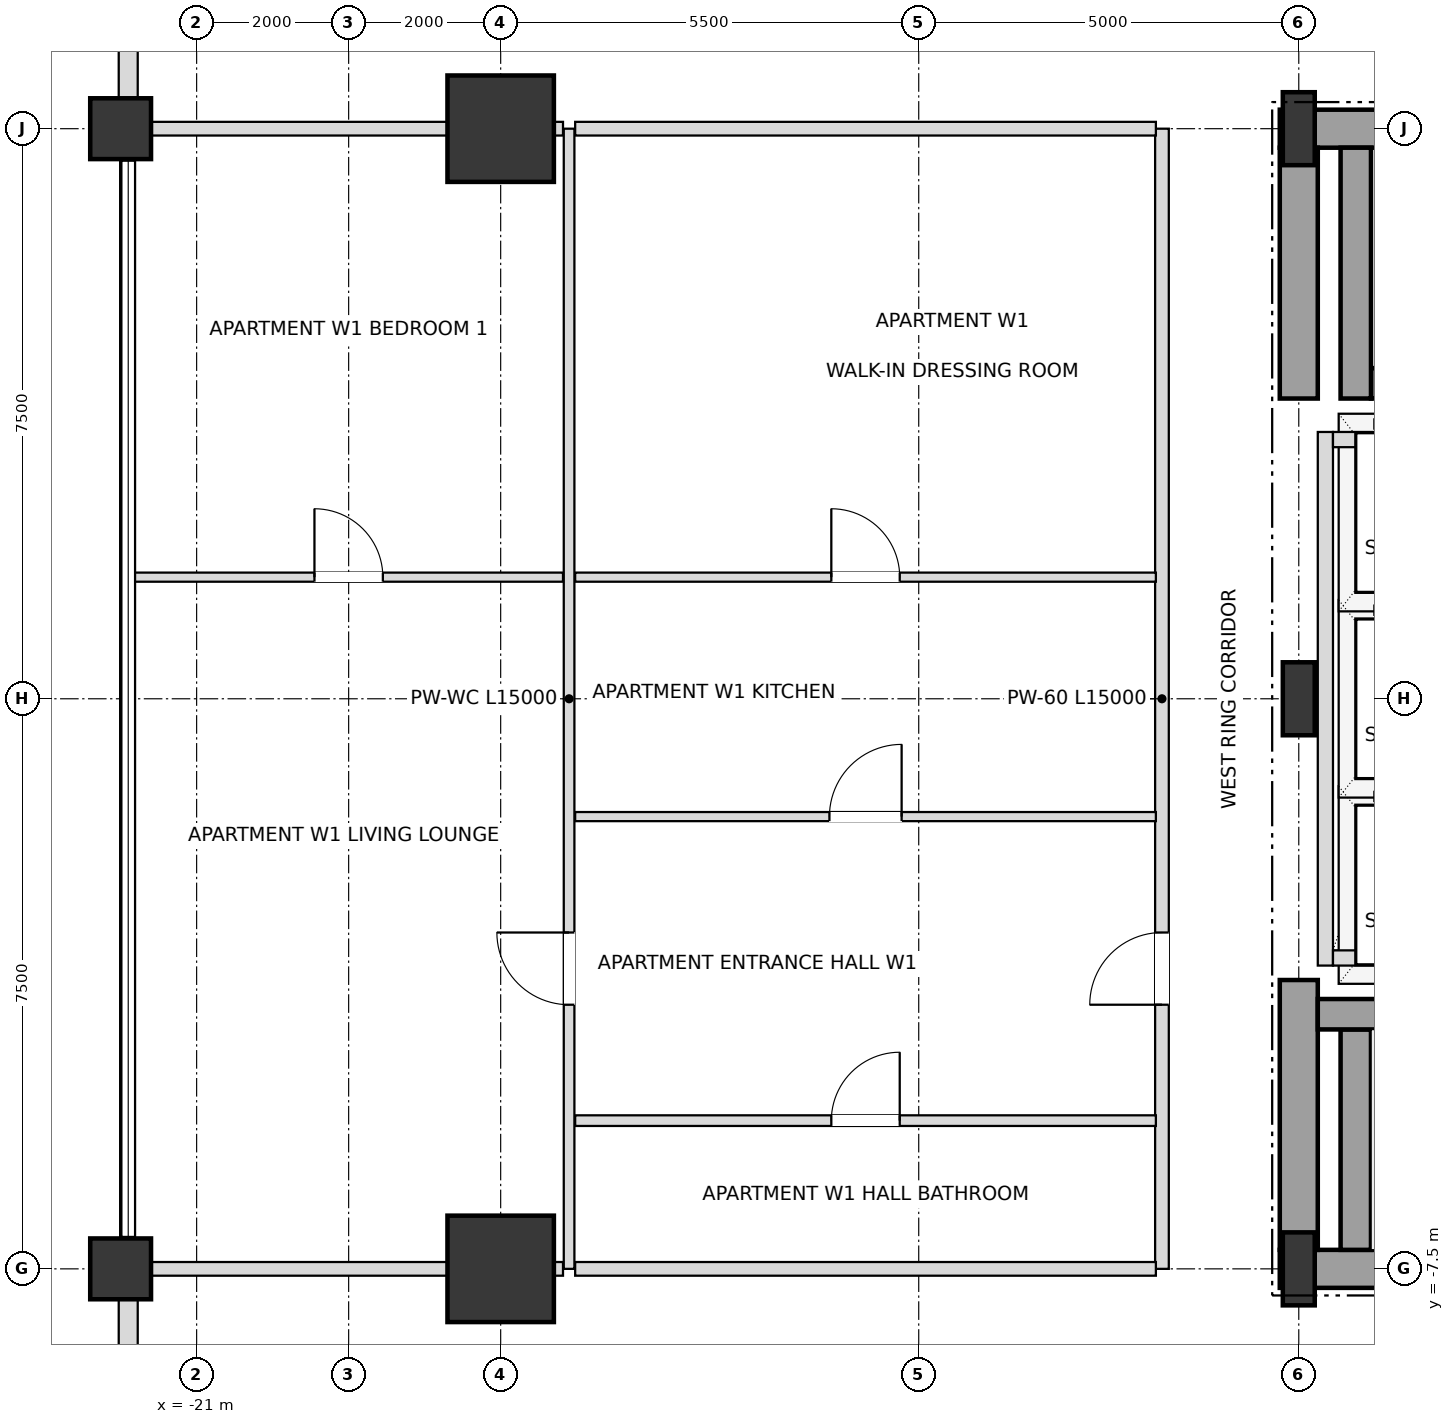
"""IFC4 building model, lengths in metres.
Left out: names, types, materials, properties, quantities, classifications, styles, units other than length and angle.
Written with IfcOpenShell. Run it as: python <this file> out.ifc"""

import sys

from ifc_helpers import new_model, si_unit, direction, frame, frame_2d, origin, origin_2d, place, context, subcontext, project, spatial, rectangle, i_section, extrude, element, fill, save


model = new_model("IFC4")
c1 = context("Model", 3, precision=1e-05, world=origin(), true_north=direction((0.0, 1.0)))
c2 = subcontext(c1, "Body", "Model", "MODEL_VIEW")
j1 = project(units=[si_unit("LENGTHUNIT", "METRE"), si_unit("PLANEANGLEUNIT", "RADIAN")], contexts=[c1])
p1 = place(None, origin())
s1 = spatial("IfcSite", under=j1, at=p1, CompositionType="ELEMENT")
p2 = place(p1, origin())
s2 = spatial("IfcBuilding", under=s1, at=p2, CompositionType="ELEMENT")
p3 = place(p2, frame((0.0, 0.0, 75.6)))
s3 = spatial("IfcBuildingStorey", under=s2, at=p3, CompositionType="ELEMENT", Elevation=75.6)
for number, where, z_axis, x_axis in (
    (1, (-6.5, -7.5, 0.0), (0.0, 0.0, 1.0), (1.0, 0.0, 0.0)),
    (2, (-6.5, 0.0, 0.0), (0.0, 0.0, 1.0), (1.0, 0.0, 0.0)),
    (3, (-6.5, 7.5, 0.0), (0.0, 0.0, 1.0), (1.0, 0.0, 0.0)),
):
    element("IfcColumn", number, at=place(p3, frame(where, z_axis=z_axis, x_axis=x_axis)), inside=s3, PredefinedType="COLUMN", context=c2, shape_type="SweptSolid", body=[
        extrude(i_section(OverallWidth=0.42, OverallDepth=0.96, WebThickness=0.022, FlangeThickness=0.034, at=origin_2d()), origin(), (0.0, 0.0, 1.0), 3.6),
    ])
for number, where, z_axis, x_axis in (
    (4, (-17.0, 7.5, 0.0), (0.0, 0.0, 1.0), (1.0, 0.0, 0.0)),
    (5, (-17.0, -7.5, 0.0), (0.0, 0.0, 1.0), (1.0, 0.0, 0.0)),
):
    element("IfcColumn", number, at=place(p3, frame(where, z_axis=z_axis, x_axis=x_axis)), inside=s3, PredefinedType="USERDEFINED", context=c2, shape_type="SweptSolid", body=[
        extrude(rectangle(XDim=1.4, YDim=1.4, at=origin_2d()), origin(), (0.0, 0.0, 1.0), 3.6),
    ])
for number, where, z_axis, x_axis in (
    (6, (-22.0, -7.5, 0.0), (0.0, 0.0, 1.0), (1.0, 0.0, 0.0)),
    (7, (-22.0, 7.5, 0.0), (0.0, 0.0, 1.0), (1.0, 0.0, 0.0)),
):
    element("IfcColumn", number, at=place(p3, frame(where, z_axis=z_axis, x_axis=x_axis)), inside=s3, PredefinedType="COLUMN", context=c2, shape_type="SweptSolid", body=[
        extrude(rectangle(XDim=0.8, YDim=0.8, at=origin_2d()), origin(), (0.0, 0.0, 1.0), 3.6),
    ])
p4 = place(p3, frame((-21.9, 12.605, 0.0), z_axis=(0.0, 0.0, 1.0), x_axis=(0.0, -1.0, 0.0)))
e8 = element("IfcWall", 8, at=p4, inside=s3, PredefinedType="SOLIDWALL", context=c2, shape_type="SweptSolid", body=[
    extrude(rectangle(XDim=4.71, YDim=0.25, at=frame_2d((2.355, 0.0))), origin(), (0.0, 0.0, 1.0), 2.736),
])
p5 = place(p4, frame((1.455, 0.0, 0.72)))
e9 = element("IfcOpeningElement", 9, at=p5, cuts=e8, PredefinedType="OPENING", context=c2, shape_type="SweptSolid", body=[
    extrude(rectangle(XDim=1.8, YDim=1.68, at=frame_2d((0.9, 0.84))), frame((0.0, 0.135, 0.0), z_axis=(0.0, -1.0, 0.0), x_axis=(1.0, 0.0, 0.0)), (0.0, 0.0, 1.0), 0.27),
])
p6 = place(p3, frame((-21.9, -7.895, 0.0), z_axis=(0.0, 0.0, 1.0), x_axis=(0.0, -1.0, 0.0)))
e10 = element("IfcWall", 10, at=p6, inside=s3, PredefinedType="SOLIDWALL", context=c2, shape_type="SweptSolid", body=[
    extrude(rectangle(XDim=4.71, YDim=0.25, at=frame_2d((2.355, 0.0))), origin(), (0.0, 0.0, 1.0), 2.736),
])
p7 = place(p6, frame((1.455, 0.0, 0.72)))
e11 = element("IfcOpeningElement", 11, at=p7, cuts=e10, PredefinedType="OPENING", context=c2, shape_type="SweptSolid", body=[
    extrude(rectangle(XDim=1.8, YDim=1.68, at=frame_2d((0.9, 0.84))), frame((0.0, 0.135, 0.0), z_axis=(0.0, -1.0, 0.0), x_axis=(1.0, 0.0, 0.0)), (0.0, 0.0, 1.0), 0.27),
])
p8 = place(p3, frame((-6.75, -7.5, 0.0), z_axis=(0.0, 0.0, 1.0), x_axis=(1.0, 0.0, 0.0)))
e12 = element("IfcWall", 12, at=p8, inside=s3, PredefinedType="SHEAR", context=c2, shape_type="SweptSolid", body=[
    extrude(rectangle(XDim=6.75, YDim=0.5, at=frame_2d((3.375, 0.0))), origin(), (0.0, 0.0, 1.0), 3.38),
])
p9 = place(p3, frame((-6.75, 7.5, 0.0), z_axis=(0.0, 0.0, 1.0), x_axis=(1.0, 0.0, 0.0)))
e13 = element("IfcWall", 13, at=p9, inside=s3, PredefinedType="SHEAR", context=c2, shape_type="SweptSolid", body=[
    extrude(rectangle(XDim=6.75, YDim=0.5, at=frame_2d((3.375, 0.0))), origin(), (0.0, 0.0, 1.0), 3.38),
])
p10 = place(p9, frame((1.65, 0.0, 0.0)))
e14 = element("IfcOpeningElement", 14, at=p10, cuts=e13, PredefinedType="OPENING", context=c2, shape_type="SweptSolid", body=[
    extrude(rectangle(XDim=1.05, YDim=2.15, at=frame_2d((0.525, 1.075))), frame((0.0, 0.26, 0.0), z_axis=(0.0, -1.0, 0.0), x_axis=(1.0, 0.0, 0.0)), (0.0, 0.0, 1.0), 0.52),
])
p11 = place(p3, frame((-6.5, -7.25, 0.0), z_axis=(0.0, 0.0, 1.0), x_axis=(0.0, 1.0, 0.0)))
e15 = element("IfcWall", 15, at=p11, inside=s3, PredefinedType="SHEAR", context=c2, shape_type="SweptSolid", body=[
    extrude(rectangle(XDim=3.55, YDim=0.5, at=frame_2d((1.775, 0.0))), origin(), (0.0, 0.0, 1.0), 3.38),
])
p12 = place(p3, frame((-6.5, 3.95, 0.0), z_axis=(0.0, 0.0, 1.0), x_axis=(0.0, 1.0, 0.0)))
e16 = element("IfcWall", 16, at=p12, inside=s3, PredefinedType="SHEAR", context=c2, shape_type="SweptSolid", body=[
    extrude(rectangle(XDim=3.3, YDim=0.5, at=frame_2d((1.65, 0.0))), origin(), (0.0, 0.0, 1.0), 3.38),
])
p13 = place(p3, frame((-5.75, -7.25, 0.0), z_axis=(0.0, 0.0, 1.0), x_axis=(0.0, 1.0, 0.0)))
e17 = element("IfcWall", 17, at=p13, inside=s3, PredefinedType="SHEAR", context=c2, shape_type="SweptSolid", body=[
    extrude(rectangle(XDim=2.9, YDim=0.4, at=frame_2d((1.45, 0.0))), origin(), (0.0, 0.0, 1.0), 3.38),
])
p14 = place(p3, frame((-6.25, -4.15, 0.0), z_axis=(0.0, 0.0, 1.0), x_axis=(1.0, 0.0, 0.0)))
e18 = element("IfcWall", 18, at=p14, inside=s3, PredefinedType="SHEAR", context=c2, shape_type="SweptSolid", body=[
    extrude(rectangle(XDim=7.78, YDim=0.4, at=frame_2d((3.89, 0.0))), origin(), (0.0, 0.0, 1.0), 3.38),
])
p15 = place(p3, frame((-5.55, 4.15, 0.0), z_axis=(0.0, 0.0, 1.0), x_axis=(1.0, 0.0, 0.0)))
e19 = element("IfcWall", 19, at=p15, inside=s3, PredefinedType="SHEAR", context=c2, shape_type="SweptSolid", body=[
    extrude(rectangle(XDim=7.08, YDim=0.4, at=frame_2d((3.54, 0.0))), origin(), (0.0, 0.0, 1.0), 3.38),
])
p16 = place(p3, frame((-5.75, 3.95, 0.0), z_axis=(0.0, 0.0, 1.0), x_axis=(0.0, 1.0, 0.0)))
e20 = element("IfcWall", 20, at=p16, inside=s3, PredefinedType="SHEAR", context=c2, shape_type="SweptSolid", body=[
    extrude(rectangle(XDim=3.3, YDim=0.4, at=frame_2d((1.65, 0.0))), origin(), (0.0, 0.0, 1.0), 3.38),
])
p17 = place(p3, frame((-6.15, -3.51, 0.0), z_axis=(0.0, 0.0, 1.0), x_axis=(0.0, 1.0, 0.0)))
e21 = element("IfcWall", 21, at=p17, inside=s3, PredefinedType="SOLIDWALL", context=c2, shape_type="SweptSolid", body=[
    extrude(rectangle(XDim=7.02, YDim=0.2, at=frame_2d((3.51, 0.0))), origin(), (0.0, 0.0, 1.0), 3.38),
])
for number, where, z_axis, x_axis in (
    (22, (-6.05, -3.41, 0.0), (0.0, 0.0, 1.0), (1.0, 0.0, 0.0)),
    (23, (-6.05, 3.41, 0.0), (0.0, 0.0, 1.0), (1.0, 0.0, 0.0)),
):
    element("IfcWall", number, at=place(p3, frame(where, z_axis=z_axis, x_axis=x_axis)), inside=s3, PredefinedType="SOLIDWALL", context=c2, shape_type="SweptSolid", body=[
        extrude(rectangle(XDim=2.2, YDim=0.2, at=frame_2d((1.1, 0.0))), origin(), (0.0, 0.0, 1.0), 3.38),
    ])
p18 = place(p3, frame((-16.1, -7.5, 0.0), z_axis=(0.0, 0.0, 1.0), x_axis=(0.0, 1.0, 0.0)))
e24 = element("IfcWall", 24, at=p18, inside=s3, PredefinedType="PARTITIONING", context=c2, shape_type="SweptSolid", body=[
    extrude(rectangle(XDim=15.0, YDim=0.14, at=frame_2d((7.5, 0.0))), origin(), (0.0, 0.0, 1.0), 3.38),
])
p19 = place(p18, frame((3.475, 0.0, 0.0)))
e25 = element("IfcOpeningElement", 25, at=p19, cuts=e24, PredefinedType="OPENING", context=c2, shape_type="SweptSolid", body=[
    extrude(rectangle(XDim=0.95, YDim=2.1, at=frame_2d((0.475, 1.05))), frame((0.0, 0.08, 0.0), z_axis=(0.0, -1.0, 0.0), x_axis=(1.0, 0.0, 0.0)), (0.0, 0.0, 1.0), 0.16),
])
p20 = place(p3, frame((-8.3, -7.5, 0.0), z_axis=(0.0, 0.0, 1.0), x_axis=(0.0, 1.0, 0.0)))
e26 = element("IfcWall", 26, at=p20, inside=s3, PredefinedType="PARTITIONING", context=c2, shape_type="SweptSolid", body=[
    extrude(rectangle(XDim=15.0, YDim=0.18, at=frame_2d((7.5, 0.0))), origin(), (0.0, 0.0, 1.0), 3.38),
])
p21 = place(p20, frame((3.475, 0.0, 0.0)))
e27 = element("IfcOpeningElement", 27, at=p21, cuts=e26, PredefinedType="OPENING", context=c2, shape_type="SweptSolid", body=[
    extrude(rectangle(XDim=0.95, YDim=2.15, at=frame_2d((0.475, 1.075))), frame((0.0, 0.1, 0.0), z_axis=(0.0, -1.0, 0.0), x_axis=(1.0, 0.0, 0.0)), (0.0, 0.0, 1.0), 0.2),
])
p22 = place(p3, frame((-21.9, -7.5, 0.0), z_axis=(0.0, 0.0, 1.0), x_axis=(1.0, 0.0, 0.0)))
e28 = element("IfcWall", 28, at=p22, inside=s3, PredefinedType="PARTITIONING", context=c2, shape_type="SweptSolid", body=[
    extrude(rectangle(XDim=5.72, YDim=0.18, at=frame_2d((2.86, 0.0))), origin(), (0.0, 0.0, 1.0), 2.816),
])
p23 = place(p3, frame((-16.02, -7.5, 0.0), z_axis=(0.0, 0.0, 1.0), x_axis=(1.0, 0.0, 0.0)))
e29 = element("IfcWall", 29, at=p23, inside=s3, PredefinedType="PARTITIONING", context=c2, shape_type="SweptSolid", body=[
    extrude(rectangle(XDim=7.64, YDim=0.18, at=frame_2d((3.82, 0.0))), origin(), (0.0, 0.0, 1.0), 2.816),
])
p24 = place(p3, frame((-16.02, -5.55, 0.0), z_axis=(0.0, 0.0, 1.0), x_axis=(1.0, 0.0, 0.0)))
e30 = element("IfcWall", 30, at=p24, inside=s3, PredefinedType="PARTITIONING", context=c2, shape_type="SweptSolid", body=[
    extrude(rectangle(XDim=7.64, YDim=0.14, at=frame_2d((3.82, 0.0))), origin(), (0.0, 0.0, 1.0), 2.948),
])
p25 = place(p24, frame((3.37, 0.0, 0.0)))
e31 = element("IfcOpeningElement", 31, at=p25, cuts=e30, PredefinedType="OPENING", context=c2, shape_type="SweptSolid", body=[
    extrude(rectangle(XDim=0.9, YDim=2.1, at=frame_2d((0.45, 1.05))), frame((0.0, 0.08, 0.0), z_axis=(0.0, -1.0, 0.0), x_axis=(1.0, 0.0, 0.0)), (0.0, 0.0, 1.0), 0.16),
])
p26 = place(p3, frame((-16.02, -1.55, 0.0), z_axis=(0.0, 0.0, 1.0), x_axis=(1.0, 0.0, 0.0)))
e32 = element("IfcWall", 32, at=p26, inside=s3, PredefinedType="PARTITIONING", context=c2, shape_type="SweptSolid", body=[
    extrude(rectangle(XDim=7.64, YDim=0.12, at=frame_2d((3.82, 0.0))), origin(), (0.0, 0.0, 1.0), 2.948),
])
p27 = place(p26, frame((3.345, 0.0, 0.0)))
e33 = element("IfcOpeningElement", 33, at=p27, cuts=e32, PredefinedType="OPENING", context=c2, shape_type="SweptSolid", body=[
    extrude(rectangle(XDim=0.95, YDim=2.1, at=frame_2d((0.475, 1.05))), frame((0.0, 0.07, 0.0), z_axis=(0.0, -1.0, 0.0), x_axis=(1.0, 0.0, 0.0)), (0.0, 0.0, 1.0), 0.14),
])
p28 = place(p3, frame((-21.82, 1.6, 0.0), z_axis=(0.0, 0.0, 1.0), x_axis=(1.0, 0.0, 0.0)))
e34 = element("IfcWall", 34, at=p28, inside=s3, PredefinedType="PARTITIONING", context=c2, shape_type="SweptSolid", body=[
    extrude(rectangle(XDim=5.64, YDim=0.12, at=frame_2d((2.82, 0.0))), origin(), (0.0, 0.0, 1.0), 2.816),
])
p29 = place(p28, frame((2.37, 0.0, 0.0)))
e35 = element("IfcOpeningElement", 35, at=p29, cuts=e34, PredefinedType="OPENING", context=c2, shape_type="SweptSolid", body=[
    extrude(rectangle(XDim=0.9, YDim=2.1, at=frame_2d((0.45, 1.05))), frame((0.0, 0.07, 0.0), z_axis=(0.0, -1.0, 0.0), x_axis=(1.0, 0.0, 0.0)), (0.0, 0.0, 1.0), 0.14),
])
p30 = place(p3, frame((-16.02, 1.6, 0.0), z_axis=(0.0, 0.0, 1.0), x_axis=(1.0, 0.0, 0.0)))
e36 = element("IfcWall", 36, at=p30, inside=s3, PredefinedType="PARTITIONING", context=c2, shape_type="SweptSolid", body=[
    extrude(rectangle(XDim=7.64, YDim=0.12, at=frame_2d((3.82, 0.0))), origin(), (0.0, 0.0, 1.0), 2.948),
])
p31 = place(p30, frame((3.37, 0.0, 0.0)))
e37 = element("IfcOpeningElement", 37, at=p31, cuts=e36, PredefinedType="OPENING", context=c2, shape_type="SweptSolid", body=[
    extrude(rectangle(XDim=0.9, YDim=2.1, at=frame_2d((0.45, 1.05))), frame((0.0, 0.07, 0.0), z_axis=(0.0, -1.0, 0.0), x_axis=(1.0, 0.0, 0.0)), (0.0, 0.0, 1.0), 0.14),
])
p32 = place(p3, frame((-21.9, 7.5, 0.0), z_axis=(0.0, 0.0, 1.0), x_axis=(1.0, 0.0, 0.0)))
e38 = element("IfcWall", 38, at=p32, inside=s3, PredefinedType="PARTITIONING", context=c2, shape_type="SweptSolid", body=[
    extrude(rectangle(XDim=5.72, YDim=0.18, at=frame_2d((2.86, 0.0))), origin(), (0.0, 0.0, 1.0), 2.816),
])
p33 = place(p3, frame((-16.02, 7.5, 0.0), z_axis=(0.0, 0.0, 1.0), x_axis=(1.0, 0.0, 0.0)))
e39 = element("IfcWall", 39, at=p33, inside=s3, PredefinedType="PARTITIONING", context=c2, shape_type="SweptSolid", body=[
    extrude(rectangle(XDim=7.64, YDim=0.18, at=frame_2d((3.82, 0.0))), origin(), (0.0, 0.0, 1.0), 2.816),
])
p34 = place(p25, origin())
e40 = element("IfcDoor", 40, at=p34, inside=s3, OperationType="SINGLE_SWING_RIGHT", PredefinedType="DOOR", context=c2, shape_type="SweptSolid", body=[
    extrude(rectangle(XDim=0.9, YDim=2.1, at=frame_2d((0.45, 1.05))), frame((0.0, 0.025, 0.0), z_axis=(0.0, -1.0, 0.0), x_axis=(1.0, 0.0, 0.0)), (0.0, 0.0, 1.0), 0.05),
])
fill(e31, e40)
p35 = place(p21, origin())
e41 = element("IfcDoor", 41, at=p35, inside=s3, OperationType="SINGLE_SWING_LEFT", PredefinedType="DOOR", context=c2, shape_type="SweptSolid", body=[
    extrude(rectangle(XDim=0.95, YDim=2.15, at=frame_2d((0.475, 1.075))), frame((0.0, 0.025, 0.0), z_axis=(0.0, -1.0, 0.0), x_axis=(1.0, 0.0, 0.0)), (0.0, 0.0, 1.0), 0.05),
])
fill(e27, e41)
p36 = place(p27, origin())
e42 = element("IfcDoor", 42, at=p36, inside=s3, OperationType="SINGLE_SWING_RIGHT", PredefinedType="DOOR", context=c2, shape_type="SweptSolid", body=[
    extrude(rectangle(XDim=0.95, YDim=2.1, at=frame_2d((0.475, 1.05))), frame((0.0, 0.025, 0.0), z_axis=(0.0, -1.0, 0.0), x_axis=(1.0, 0.0, 0.0)), (0.0, 0.0, 1.0), 0.05),
])
fill(e33, e42)
p37 = place(p31, origin())
e43 = element("IfcDoor", 43, at=p37, inside=s3, OperationType="SINGLE_SWING_LEFT", PredefinedType="DOOR", context=c2, shape_type="SweptSolid", body=[
    extrude(rectangle(XDim=0.9, YDim=2.1, at=frame_2d((0.45, 1.05))), frame((0.0, 0.025, 0.0), z_axis=(0.0, -1.0, 0.0), x_axis=(1.0, 0.0, 0.0)), (0.0, 0.0, 1.0), 0.05),
])
fill(e37, e43)
p38 = place(p19, origin())
e44 = element("IfcDoor", 44, at=p38, inside=s3, OperationType="SINGLE_SWING_RIGHT", PredefinedType="DOOR", context=c2, shape_type="SweptSolid", body=[
    extrude(rectangle(XDim=0.95, YDim=2.1, at=frame_2d((0.475, 1.05))), frame((0.0, 0.025, 0.0), z_axis=(0.0, -1.0, 0.0), x_axis=(1.0, 0.0, 0.0)), (0.0, 0.0, 1.0), 0.05),
])
fill(e25, e44)
p39 = place(p29, origin())
e45 = element("IfcDoor", 45, at=p39, inside=s3, OperationType="SINGLE_SWING_LEFT", PredefinedType="DOOR", context=c2, shape_type="SweptSolid", body=[
    extrude(rectangle(XDim=0.9, YDim=2.1, at=frame_2d((0.45, 1.05))), frame((0.0, 0.025, 0.0), z_axis=(0.0, -1.0, 0.0), x_axis=(1.0, 0.0, 0.0)), (0.0, 0.0, 1.0), 0.05),
])
fill(e35, e45)
save(model, sys.argv[1])
